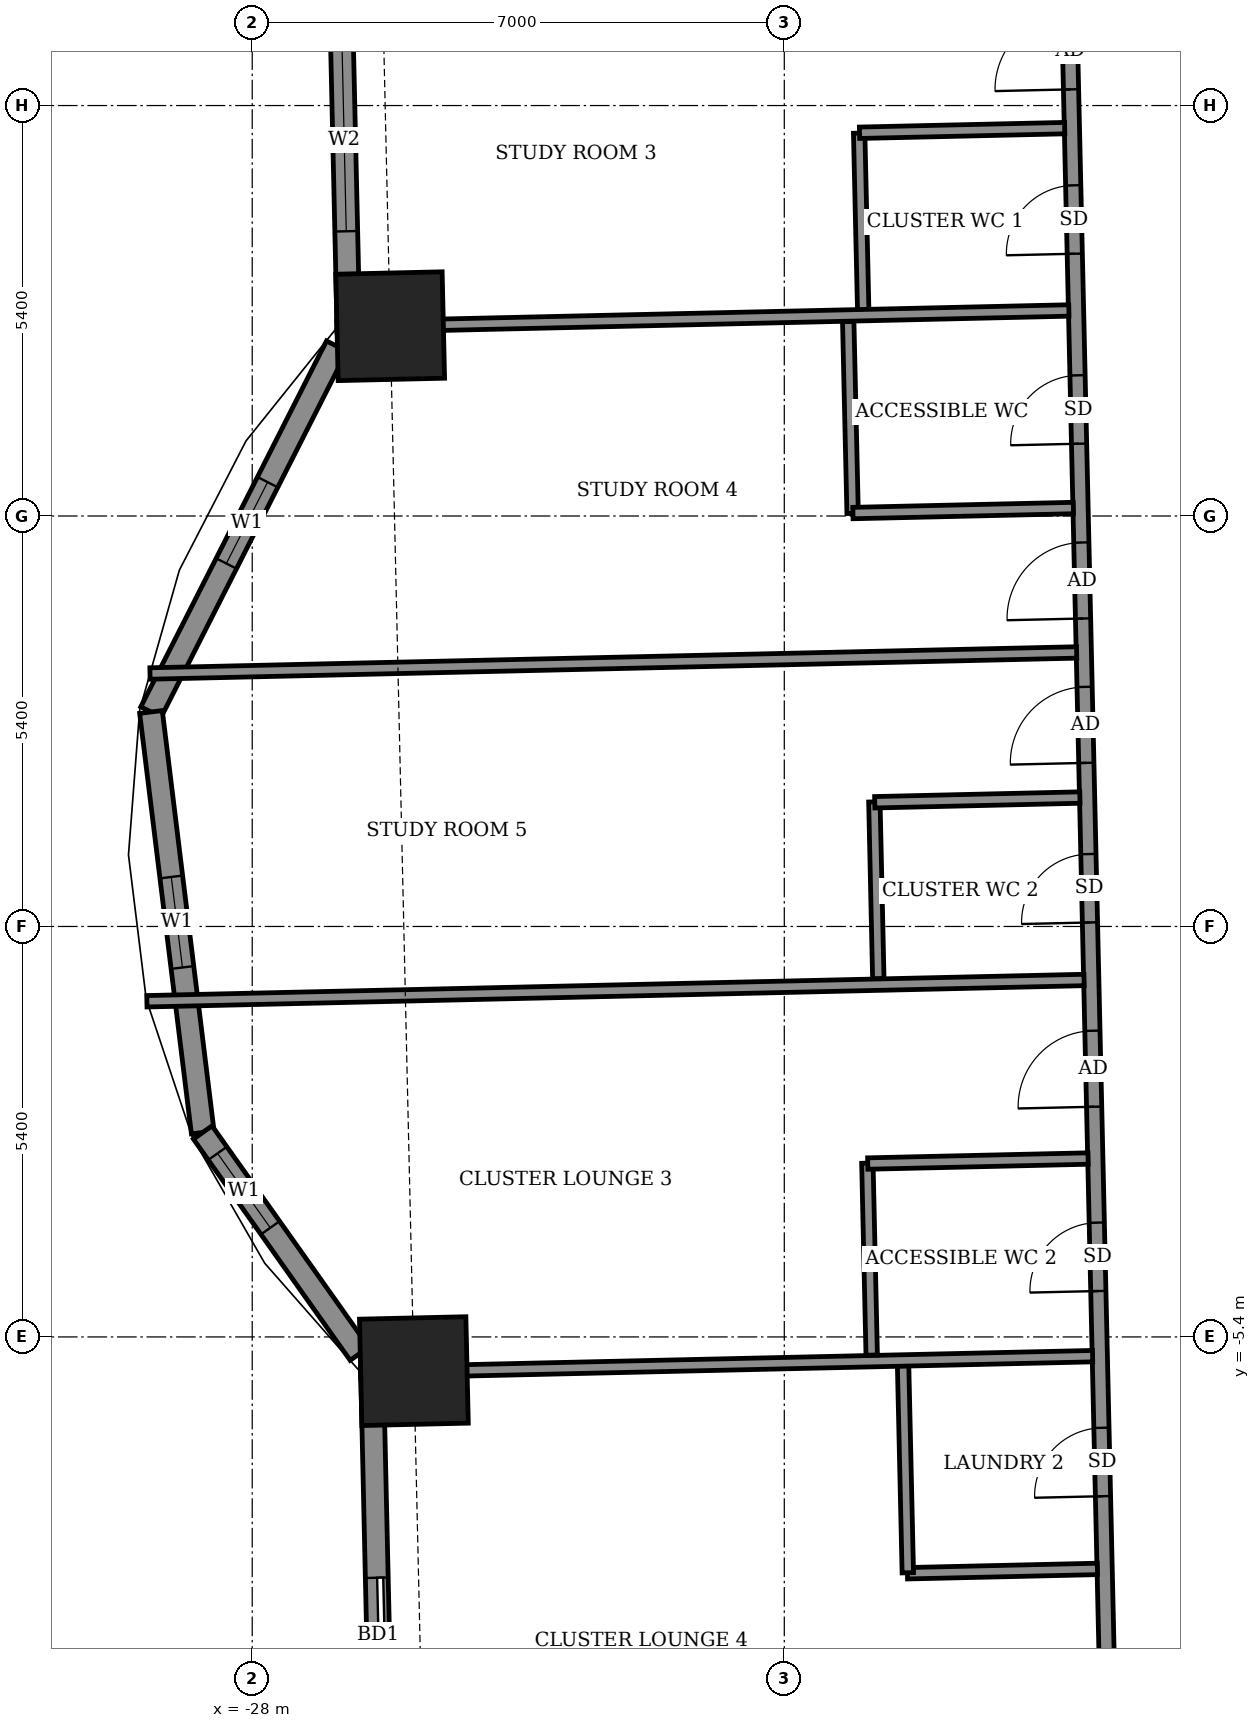
"""IFC4 building model, lengths in metres.
Left out: names, types, materials, properties, quantities, classifications, styles, units other than length and angle.
Written with IfcOpenShell. Run it as: python <this file> out.ifc"""

import sys

from ifc_helpers import new_model, si_unit, direction, frame, frame_2d, origin, origin_2d, place, context, subcontext, project, spatial, rectangle, extrude, element, fill, save


model = new_model("IFC4")
c1 = context("Model", 3, precision=1e-05, world=origin(), true_north=direction((0.0, 1.0)))
c2 = subcontext(c1, "Body", "Model", "MODEL_VIEW")
j1 = project(units=[si_unit("LENGTHUNIT", "METRE"), si_unit("PLANEANGLEUNIT", "RADIAN")], contexts=[c1])
p1 = place(None, origin())
s1 = spatial("IfcSite", under=j1, at=p1, CompositionType="ELEMENT")
p2 = place(p1, origin())
s2 = spatial("IfcBuilding", under=s1, at=p2, CompositionType="ELEMENT")
p3 = place(p2, frame((0.0, 0.0, 90.1)))
s3 = spatial("IfcBuildingStorey", under=s2, at=p3, CompositionType="ELEMENT", Elevation=90.1)
for number, where, z_axis, x_axis in (
    (1, (-25.873, -5.85, -0.55), (0.0, 0.0, 1.0), (0.023, -1.0, 0.0)),
    (2, (-26.185, 7.897, -0.55), (0.0, 0.0, 1.0), (0.023, -1.0, 0.0)),
):
    element("IfcColumn", number, at=place(p3, frame(where, z_axis=z_axis, x_axis=x_axis)), inside=s3, PredefinedType="COLUMN", context=c2, shape_type="SweptSolid", body=[
        extrude(rectangle(XDim=1.4, YDim=1.4, at=origin_2d()), origin(), (0.0, 0.0, 1.0), 3.6),
    ])
p4 = place(p3, frame((-27.036, 21.155, 0.0), z_axis=(0.0, 0.0, 1.0), x_axis=(0.022730142562, -0.999741636934, 0.0)))
e3 = element("IfcWall", 3, at=p4, inside=s3, PredefinedType="SOLIDWALL", context=c2, shape_type="SweptSolid", body=[
    extrude(rectangle(XDim=13.329, YDim=0.3, at=frame_2d((6.665, 0.0))), origin(), (0.0, 0.0, 1.0), 3.05),
])
p5 = place(p4, frame((2.805, 0.0, 0.0)))
e4 = element("IfcOpeningElement", 4, at=p5, cuts=e3, PredefinedType="OPENING", context=c2, shape_type="SweptSolid", body=[
    extrude(rectangle(XDim=1.5, YDim=2.4, at=frame_2d((0.75, 1.2))), frame((0.0, 0.16, 0.0), z_axis=(0.0, -1.0, 0.0), x_axis=(1.0, 0.0, 0.0)), (0.0, 0.0, 1.0), 0.32),
])
p6 = place(p4, frame((9.612, 0.0, 0.9)))
e5 = element("IfcOpeningElement", 5, at=p6, cuts=e3, PredefinedType="OPENING", context=c2, shape_type="SweptSolid", body=[
    extrude(rectangle(XDim=2.4, YDim=1.5, at=frame_2d((1.2, 0.75))), frame((0.0, 0.16, 0.0), z_axis=(0.0, -1.0, 0.0), x_axis=(1.0, 0.0, 0.0)), (0.0, 0.0, 1.0), 0.32),
])
p7 = place(p3, frame((-26.889, 7.635, 0.0), z_axis=(0.0, 0.0, 1.0), x_axis=(-0.452633159278, -0.891696822425, 0.0)))
e6 = element("IfcWall", 6, at=p7, inside=s3, PredefinedType="SOLIDWALL", context=c2, shape_type="SweptSolid", body=[
    extrude(rectangle(XDim=5.397, YDim=0.3, at=frame_2d((2.699, 0.0))), origin(), (0.0, 0.0, 1.0), 3.05),
])
p8 = place(p7, frame((2.007, 0.0, 0.9)))
e7 = element("IfcOpeningElement", 7, at=p8, cuts=e6, PredefinedType="OPENING", context=c2, shape_type="SweptSolid", body=[
    extrude(rectangle(XDim=1.2, YDim=1.5, at=frame_2d((0.6, 0.75))), frame((0.0, 0.16, 0.0), z_axis=(0.0, -1.0, 0.0), x_axis=(1.0, 0.0, 0.0)), (0.0, 0.0, 1.0), 0.32),
])
p9 = place(p3, frame((-29.332, 2.822, 0.0), z_axis=(0.0, 0.0, 1.0), x_axis=(0.122206978992, -0.992504636909, 0.0)))
e8 = element("IfcWall", 8, at=p9, inside=s3, PredefinedType="SOLIDWALL", context=c2, shape_type="SweptSolid", body=[
    extrude(rectangle(XDim=5.574, YDim=0.3, at=frame_2d((2.787, 0.0))), origin(), (0.0, 0.0, 1.0), 3.05),
])
p10 = place(p9, frame((2.187, 0.0, 0.9)))
e9 = element("IfcOpeningElement", 9, at=p10, cuts=e8, PredefinedType="OPENING", context=c2, shape_type="SweptSolid", body=[
    extrude(rectangle(XDim=1.2, YDim=1.5, at=frame_2d((0.6, 0.75))), frame((0.0, 0.16, 0.0), z_axis=(0.0, -1.0, 0.0), x_axis=(1.0, 0.0, 0.0)), (0.0, 0.0, 1.0), 0.32),
])
p11 = place(p3, frame((-28.651, -2.71, 0.0), z_axis=(0.0, 0.0, 1.0), x_axis=(0.577964171051, -0.816062140392, 0.0)))
e10 = element("IfcWall", 10, at=p11, inside=s3, PredefinedType="SOLIDWALL", context=c2, shape_type="SweptSolid", body=[
    extrude(rectangle(XDim=3.567, YDim=0.3, at=frame_2d((1.784, 0.0))), origin(), (0.0, 0.0, 1.0), 3.05),
])
p12 = place(p11, frame((0.337, 0.0, 0.9)))
e11 = element("IfcOpeningElement", 11, at=p12, cuts=e10, PredefinedType="OPENING", context=c2, shape_type="SweptSolid", body=[
    extrude(rectangle(XDim=1.2, YDim=1.5, at=frame_2d((0.6, 0.75))), frame((0.0, 0.16, 0.0), z_axis=(0.0, -1.0, 0.0), x_axis=(1.0, 0.0, 0.0)), (0.0, 0.0, 1.0), 0.32),
])
p13 = place(p3, frame((-26.424, -5.808, 0.0), z_axis=(0.0, 0.0, 1.0), x_axis=(0.022654755793, -0.999743348085, 0.0)))
e12 = element("IfcWall", 12, at=p13, inside=s3, PredefinedType="SOLIDWALL", context=c2, shape_type="SweptSolid", body=[
    extrude(rectangle(XDim=13.729, YDim=0.3, at=frame_2d((6.865, 0.0))), origin(), (0.0, 0.0, 1.0), 3.05),
])
p14 = place(p13, frame((2.761, 0.0, 0.0)))
e13 = element("IfcOpeningElement", 13, at=p14, cuts=e12, PredefinedType="OPENING", context=c2, shape_type="SweptSolid", body=[
    extrude(rectangle(XDim=1.5, YDim=2.4, at=frame_2d((0.75, 1.2))), frame((0.0, 0.16, 0.0), z_axis=(0.0, -1.0, 0.0), x_axis=(1.0, 0.0, 0.0)), (0.0, 0.0, 1.0), 0.32),
])
p15 = place(p13, frame((8.894, 0.0, 0.9)))
e14 = element("IfcOpeningElement", 14, at=p15, cuts=e12, PredefinedType="OPENING", context=c2, shape_type="SweptSolid", body=[
    extrude(rectangle(XDim=2.4, YDim=1.5, at=frame_2d((1.2, 0.75))), frame((0.0, 0.16, 0.0), z_axis=(0.0, -1.0, 0.0), x_axis=(1.0, 0.0, 0.0)), (0.0, 0.0, 1.0), 0.32),
])
p16 = place(p3, frame((-29.57, 10.945, 0.0), z_axis=(0.0, 0.0, 1.0), x_axis=(-0.022665943652, 0.999743094499, 0.0)))
e15 = element("IfcWall", 15, at=p16, inside=s3, PredefinedType="USERDEFINED", context=c2, shape_type="SweptSolid", body=[
    extrude(rectangle(XDim=6.0, YDim=0.55, at=frame_2d((3.0, 0.0))), origin(), (0.0, 0.0, 1.0), 0.8),
])
p17 = place(p3, frame((-29.116, -9.05, 0.0), z_axis=(0.0, 0.0, 1.0), x_axis=(-0.022590224177, 0.999744808324, 0.0)))
e16 = element("IfcWall", 16, at=p17, inside=s3, PredefinedType="USERDEFINED", context=c2, shape_type="SweptSolid", body=[
    extrude(rectangle(XDim=2.875, YDim=0.55, at=frame_2d((1.438, 0.0))), origin(), (0.0, 0.0, 1.0), 0.8),
])
p18 = place(p3, frame((-16.684, -12.919, 0.0), z_axis=(0.0, 0.0, 1.0), x_axis=(-0.022706151961, 0.999742182097, 0.0)))
e17 = element("IfcWall", 17, at=p18, inside=s3, PredefinedType="PARTITIONING", context=c2, shape_type="SweptSolid", body=[
    extrude(rectangle(XDim=25.45, YDim=0.2, at=frame_2d((12.725, 0.0))), origin(), (0.0, 0.0, 1.0), 3.05),
])
p19 = place(p18, frame((23.938, 0.0, 0.0)))
e18 = element("IfcOpeningElement", 18, at=p19, cuts=e17, PredefinedType="OPENING", context=c2, shape_type="SweptSolid", body=[
    extrude(rectangle(XDim=1.0, YDim=2.1, at=frame_2d((0.5, 1.05))), frame((0.0, 0.11, 0.0), z_axis=(0.0, -1.0, 0.0), x_axis=(1.0, 0.0, 0.0)), (0.0, 0.0, 1.0), 0.22),
])
p20 = place(p18, frame((21.775, 0.0, 0.0)))
e19 = element("IfcOpeningElement", 19, at=p20, cuts=e17, PredefinedType="OPENING", context=c2, shape_type="SweptSolid", body=[
    extrude(rectangle(XDim=0.9, YDim=2.1, at=frame_2d((0.45, 1.05))), frame((0.0, 0.11, 0.0), z_axis=(0.0, -1.0, 0.0), x_axis=(1.0, 0.0, 0.0)), (0.0, 0.0, 1.0), 0.22),
])
p21 = place(p18, frame((16.975, 0.0, 0.0)))
e20 = element("IfcOpeningElement", 20, at=p21, cuts=e17, PredefinedType="OPENING", context=c2, shape_type="SweptSolid", body=[
    extrude(rectangle(XDim=1.0, YDim=2.1, at=frame_2d((0.5, 1.05))), frame((0.0, 0.11, 0.0), z_axis=(0.0, -1.0, 0.0), x_axis=(1.0, 0.0, 0.0)), (0.0, 0.0, 1.0), 0.22),
])
p22 = place(p18, frame((19.275, 0.0, 0.0)))
e21 = element("IfcOpeningElement", 21, at=p22, cuts=e17, PredefinedType="OPENING", context=c2, shape_type="SweptSolid", body=[
    extrude(rectangle(XDim=0.9, YDim=2.1, at=frame_2d((0.45, 1.05))), frame((0.0, 0.11, 0.0), z_axis=(0.0, -1.0, 0.0), x_axis=(1.0, 0.0, 0.0)), (0.0, 0.0, 1.0), 0.22),
])
p23 = place(p18, frame((15.075, 0.0, 0.0)))
e22 = element("IfcOpeningElement", 22, at=p23, cuts=e17, PredefinedType="OPENING", context=c2, shape_type="SweptSolid", body=[
    extrude(rectangle(XDim=1.0, YDim=2.1, at=frame_2d((0.5, 1.05))), frame((0.0, 0.11, 0.0), z_axis=(0.0, -1.0, 0.0), x_axis=(1.0, 0.0, 0.0)), (0.0, 0.0, 1.0), 0.22),
])
p24 = place(p18, frame((12.975, 0.0, 0.0)))
e23 = element("IfcOpeningElement", 23, at=p24, cuts=e17, PredefinedType="OPENING", context=c2, shape_type="SweptSolid", body=[
    extrude(rectangle(XDim=0.9, YDim=2.1, at=frame_2d((0.45, 1.05))), frame((0.0, 0.11, 0.0), z_axis=(0.0, -1.0, 0.0), x_axis=(1.0, 0.0, 0.0)), (0.0, 0.0, 1.0), 0.22),
])
p25 = place(p18, frame((10.55, 0.0, 0.0)))
e24 = element("IfcOpeningElement", 24, at=p25, cuts=e17, PredefinedType="OPENING", context=c2, shape_type="SweptSolid", body=[
    extrude(rectangle(XDim=1.0, YDim=2.1, at=frame_2d((0.5, 1.05))), frame((0.0, 0.11, 0.0), z_axis=(0.0, -1.0, 0.0), x_axis=(1.0, 0.0, 0.0)), (0.0, 0.0, 1.0), 0.22),
])
p26 = place(p18, frame((8.125, 0.0, 0.0)))
e25 = element("IfcOpeningElement", 25, at=p26, cuts=e17, PredefinedType="OPENING", context=c2, shape_type="SweptSolid", body=[
    extrude(rectangle(XDim=0.9, YDim=2.1, at=frame_2d((0.45, 1.05))), frame((0.0, 0.11, 0.0), z_axis=(0.0, -1.0, 0.0), x_axis=(1.0, 0.0, 0.0)), (0.0, 0.0, 1.0), 0.22),
])
p27 = place(p18, frame((1.737, 0.0, 0.0)))
e26 = element("IfcOpeningElement", 26, at=p27, cuts=e17, PredefinedType="OPENING", context=c2, shape_type="SweptSolid", body=[
    extrude(rectangle(XDim=1.0, YDim=2.1, at=frame_2d((0.5, 1.05))), frame((0.0, 0.11, 0.0), z_axis=(0.0, -1.0, 0.0), x_axis=(1.0, 0.0, 0.0)), (0.0, 0.0, 1.0), 0.22),
])
p28 = place(p18, frame((5.425, 0.0, 0.0)))
e27 = element("IfcOpeningElement", 27, at=p28, cuts=e17, PredefinedType="OPENING", context=c2, shape_type="SweptSolid", body=[
    extrude(rectangle(XDim=0.9, YDim=2.1, at=frame_2d((0.45, 1.05))), frame((0.0, 0.11, 0.0), z_axis=(0.0, -1.0, 0.0), x_axis=(1.0, 0.0, 0.0)), (0.0, 0.0, 1.0), 0.22),
])
p29 = place(p3, frame((-19.38, -8.509, 0.0), z_axis=(0.0, 0.0, 1.0), x_axis=(0.999738750294, 0.02285675306, 0.0)))
e28 = element("IfcWall", 28, at=p29, inside=s3, PredefinedType="PARTITIONING", context=c2, shape_type="SweptSolid", body=[
    extrude(rectangle(XDim=2.5, YDim=0.15, at=frame_2d((1.25, 0.0))), origin(), (0.0, 0.0, 1.0), 3.05),
])
p30 = place(p3, frame((-19.375, -8.503, 0.0), z_axis=(0.0, 0.0, 1.0), x_axis=(-0.022760079124, 0.999740955847, 0.0)))
e29 = element("IfcWall", 29, at=p30, inside=s3, PredefinedType="PARTITIONING", context=c2, shape_type="SweptSolid", body=[
    extrude(rectangle(XDim=2.725, YDim=0.15, at=frame_2d((1.362, 0.0))), origin(), (0.0, 0.0, 1.0), 3.05),
])
p31 = place(p3, frame((-26.573, -5.871, 0.0), z_axis=(0.0, 0.0, 1.0), x_axis=(0.999743768709, 0.022636186244, 0.0)))
e30 = element("IfcWall", 30, at=p31, inside=s3, PredefinedType="PARTITIONING", context=c2, shape_type="SweptSolid", body=[
    extrude(rectangle(XDim=9.631, YDim=0.15, at=frame_2d((4.816, 0.0))), origin(), (0.0, 0.0, 1.0), 3.05),
])
p32 = place(p3, frame((-19.85, -5.639, 0.0), z_axis=(0.0, 0.0, 1.0), x_axis=(-0.022523775833, 0.999746307581, 0.0)))
e31 = element("IfcWall", 31, at=p32, inside=s3, PredefinedType="PARTITIONING", context=c2, shape_type="SweptSolid", body=[
    extrude(rectangle(XDim=2.526, YDim=0.15, at=frame_2d((1.263, 0.0))), origin(), (0.0, 0.0, 1.0), 3.05),
])
p33 = place(p3, frame((-19.902, -3.119, 0.0), z_axis=(0.0, 0.0, 1.0), x_axis=(0.999741618182, 0.022730967319, 0.0)))
e32 = element("IfcWall", 32, at=p33, inside=s3, PredefinedType="PARTITIONING", context=c2, shape_type="SweptSolid", body=[
    extrude(rectangle(XDim=2.9, YDim=0.15, at=frame_2d((1.45, 0.0))), origin(), (0.0, 0.0, 1.0), 3.05),
])
p34 = place(p3, frame((-29.386, -0.984, 0.0), z_axis=(0.0, 0.0, 1.0), x_axis=(0.999742652464, 0.022685432436, 0.0)))
e33 = element("IfcWall", 33, at=p34, inside=s3, PredefinedType="PARTITIONING", context=c2, shape_type="SweptSolid", body=[
    extrude(rectangle(XDim=12.333, YDim=0.15, at=frame_2d((6.167, 0.0))), origin(), (0.0, 0.0, 1.0), 2.05),
])
p35 = place(p3, frame((-19.763, -0.685, 0.0), z_axis=(0.0, 0.0, 1.0), x_axis=(-0.022370700241, 0.999749744571, 0.0)))
e34 = element("IfcWall", 34, at=p35, inside=s3, PredefinedType="PARTITIONING", context=c2, shape_type="SweptSolid", body=[
    extrude(rectangle(XDim=2.324, YDim=0.15, at=frame_2d((1.162, 0.0))), origin(), (0.0, 0.0, 1.0), 3.05),
])
p36 = place(p3, frame((-19.81, 1.634, 0.0), z_axis=(0.0, 0.0, 1.0), x_axis=(0.999736155505, 0.022969966847, 0.0)))
e35 = element("IfcWall", 35, at=p36, inside=s3, PredefinedType="PARTITIONING", context=c2, shape_type="SweptSolid", body=[
    extrude(rectangle(XDim=2.7, YDim=0.15, at=frame_2d((1.35, 0.0))), origin(), (0.0, 0.0, 1.0), 3.05),
])
p37 = place(p3, frame((-29.345, 3.328, 0.0), z_axis=(0.0, 0.0, 1.0), x_axis=(0.999741773524, 0.022724134116, 0.0)))
e36 = element("IfcWall", 36, at=p37, inside=s3, PredefinedType="PARTITIONING", context=c2, shape_type="SweptSolid", body=[
    extrude(rectangle(XDim=12.194, YDim=0.15, at=frame_2d((6.097, 0.0))), origin(), (0.0, 0.0, 1.0), 2.05),
])
p38 = place(p3, frame((-20.101, 5.434, 0.0), z_axis=(0.0, 0.0, 1.0), x_axis=(-0.022919108675, 0.999737322729, 0.0)))
e37 = element("IfcWall", 37, at=p38, inside=s3, PredefinedType="PARTITIONING", context=c2, shape_type="SweptSolid", body=[
    extrude(rectangle(XDim=2.525, YDim=0.15, at=frame_2d((1.262, 0.0))), origin(), (0.0, 0.0, 1.0), 3.05),
])
p39 = place(p3, frame((-20.097, 5.439, 0.0), z_axis=(0.0, 0.0, 1.0), x_axis=(0.999741748633, 0.022725229174, 0.0)))
e38 = element("IfcWall", 38, at=p39, inside=s3, PredefinedType="PARTITIONING", context=c2, shape_type="SweptSolid", body=[
    extrude(rectangle(XDim=2.901, YDim=0.15, at=frame_2d((1.45, 0.0))), origin(), (0.0, 0.0, 1.0), 3.05),
])
p40 = place(p3, frame((-19.962, 8.112, 0.0), z_axis=(0.0, 0.0, 1.0), x_axis=(-0.022781023197, 0.999740478815, 0.0)))
e39 = element("IfcWall", 39, at=p40, inside=s3, PredefinedType="PARTITIONING", context=c2, shape_type="SweptSolid", body=[
    extrude(rectangle(XDim=2.325, YDim=0.15, at=frame_2d((1.163, 0.0))), origin(), (0.0, 0.0, 1.0), 3.05),
])
p41 = place(p3, frame((-26.885, 7.885, 0.0), z_axis=(0.0, 0.0, 1.0), x_axis=(0.999741468995, 0.022737527832, 0.0)))
e40 = element("IfcWall", 40, at=p41, inside=s3, PredefinedType="PARTITIONING", context=c2, shape_type="SweptSolid", body=[
    extrude(rectangle(XDim=9.631, YDim=0.15, at=frame_2d((4.816, 0.0))), origin(), (0.0, 0.0, 1.0), 3.05),
])
p42 = place(p3, frame((-20.01, 10.442, 0.0), z_axis=(0.0, 0.0, 1.0), x_axis=(0.999744396973, 0.02260842146, 0.0)))
e41 = element("IfcWall", 41, at=p42, inside=s3, PredefinedType="PARTITIONING", context=c2, shape_type="SweptSolid", body=[
    extrude(rectangle(XDim=2.7, YDim=0.15, at=frame_2d((1.35, 0.0))), origin(), (0.0, 0.0, 1.0), 3.05),
])
p43 = place(p6, origin())
e42 = element("IfcWindow", 42, at=p43, inside=s3, PartitioningType="DOUBLE_PANEL_VERTICAL", PredefinedType="WINDOW", context=c2, shape_type="SweptSolid", body=[
    extrude(rectangle(XDim=2.4, YDim=1.5, at=frame_2d((1.2, 0.75))), frame((0.0, 0.03, 0.0), z_axis=(0.0, -1.0, 0.0), x_axis=(1.0, 0.0, 0.0)), (0.0, 0.0, 1.0), 0.06),
])
fill(e5, e42)
p44 = place(p8, origin())
e43 = element("IfcWindow", 43, at=p44, inside=s3, PartitioningType="SINGLE_PANEL", PredefinedType="WINDOW", context=c2, shape_type="SweptSolid", body=[
    extrude(rectangle(XDim=1.2, YDim=1.5, at=frame_2d((0.6, 0.75))), frame((0.0, 0.03, 0.0), z_axis=(0.0, -1.0, 0.0), x_axis=(1.0, 0.0, 0.0)), (0.0, 0.0, 1.0), 0.06),
])
fill(e7, e43)
p45 = place(p10, origin())
e44 = element("IfcWindow", 44, at=p45, inside=s3, PartitioningType="SINGLE_PANEL", PredefinedType="WINDOW", context=c2, shape_type="SweptSolid", body=[
    extrude(rectangle(XDim=1.2, YDim=1.5, at=frame_2d((0.6, 0.75))), frame((0.0, 0.03, 0.0), z_axis=(0.0, -1.0, 0.0), x_axis=(1.0, 0.0, 0.0)), (0.0, 0.0, 1.0), 0.06),
])
fill(e9, e44)
p46 = place(p12, origin())
e45 = element("IfcWindow", 45, at=p46, inside=s3, PartitioningType="SINGLE_PANEL", PredefinedType="WINDOW", context=c2, shape_type="SweptSolid", body=[
    extrude(rectangle(XDim=1.2, YDim=1.5, at=frame_2d((0.6, 0.75))), frame((0.0, 0.03, 0.0), z_axis=(0.0, -1.0, 0.0), x_axis=(1.0, 0.0, 0.0)), (0.0, 0.0, 1.0), 0.06),
])
fill(e11, e45)
p47 = place(p14, origin())
e46 = element("IfcDoor", 46, at=p47, inside=s3, OperationType="SLIDING_TO_LEFT", PredefinedType="DOOR", context=c2, shape_type="SweptSolid", body=[
    extrude(rectangle(XDim=1.5, YDim=2.4, at=frame_2d((0.75, 1.2))), frame((0.0, 0.025, 0.0), z_axis=(0.0, -1.0, 0.0), x_axis=(1.0, 0.0, 0.0)), (0.0, 0.0, 1.0), 0.05),
])
fill(e13, e46)
p48 = place(p19, origin())
e47 = element("IfcDoor", 47, at=p48, inside=s3, OperationType="SINGLE_SWING_LEFT", PredefinedType="DOOR", context=c2, shape_type="SweptSolid", body=[
    extrude(rectangle(XDim=1.0, YDim=2.1, at=frame_2d((0.5, 1.05))), frame((0.0, 0.025, 0.0), z_axis=(0.0, -1.0, 0.0), x_axis=(1.0, 0.0, 0.0)), (0.0, 0.0, 1.0), 0.05),
])
fill(e18, e47)
p49 = place(p20, origin())
e48 = element("IfcDoor", 48, at=p49, inside=s3, OperationType="SINGLE_SWING_LEFT", PredefinedType="DOOR", context=c2, shape_type="SweptSolid", body=[
    extrude(rectangle(XDim=0.9, YDim=2.1, at=frame_2d((0.45, 1.05))), frame((0.0, 0.025, 0.0), z_axis=(0.0, -1.0, 0.0), x_axis=(1.0, 0.0, 0.0)), (0.0, 0.0, 1.0), 0.05),
])
fill(e19, e48)
p50 = place(p21, origin())
e49 = element("IfcDoor", 49, at=p50, inside=s3, OperationType="SINGLE_SWING_RIGHT", PredefinedType="DOOR", context=c2, shape_type="SweptSolid", body=[
    extrude(rectangle(XDim=1.0, YDim=2.1, at=frame_2d((0.5, 1.05))), frame((0.0, 0.025, 0.0), z_axis=(0.0, -1.0, 0.0), x_axis=(1.0, 0.0, 0.0)), (0.0, 0.0, 1.0), 0.05),
])
fill(e20, e49)
p51 = place(p22, origin())
e50 = element("IfcDoor", 50, at=p51, inside=s3, OperationType="SINGLE_SWING_RIGHT", PredefinedType="DOOR", context=c2, shape_type="SweptSolid", body=[
    extrude(rectangle(XDim=0.9, YDim=2.1, at=frame_2d((0.45, 1.05))), frame((0.0, 0.025, 0.0), z_axis=(0.0, -1.0, 0.0), x_axis=(1.0, 0.0, 0.0)), (0.0, 0.0, 1.0), 0.05),
])
fill(e21, e50)
p52 = place(p23, origin())
e51 = element("IfcDoor", 51, at=p52, inside=s3, OperationType="SINGLE_SWING_LEFT", PredefinedType="DOOR", context=c2, shape_type="SweptSolid", body=[
    extrude(rectangle(XDim=1.0, YDim=2.1, at=frame_2d((0.5, 1.05))), frame((0.0, 0.025, 0.0), z_axis=(0.0, -1.0, 0.0), x_axis=(1.0, 0.0, 0.0)), (0.0, 0.0, 1.0), 0.05),
])
fill(e22, e51)
p53 = place(p24, origin())
e52 = element("IfcDoor", 52, at=p53, inside=s3, OperationType="SINGLE_SWING_LEFT", PredefinedType="DOOR", context=c2, shape_type="SweptSolid", body=[
    extrude(rectangle(XDim=0.9, YDim=2.1, at=frame_2d((0.45, 1.05))), frame((0.0, 0.025, 0.0), z_axis=(0.0, -1.0, 0.0), x_axis=(1.0, 0.0, 0.0)), (0.0, 0.0, 1.0), 0.05),
])
fill(e23, e52)
p54 = place(p25, origin())
e53 = element("IfcDoor", 53, at=p54, inside=s3, OperationType="SINGLE_SWING_RIGHT", PredefinedType="DOOR", context=c2, shape_type="SweptSolid", body=[
    extrude(rectangle(XDim=1.0, YDim=2.1, at=frame_2d((0.5, 1.05))), frame((0.0, 0.025, 0.0), z_axis=(0.0, -1.0, 0.0), x_axis=(1.0, 0.0, 0.0)), (0.0, 0.0, 1.0), 0.05),
])
fill(e24, e53)
p55 = place(p26, origin())
e54 = element("IfcDoor", 54, at=p55, inside=s3, OperationType="SINGLE_SWING_RIGHT", PredefinedType="DOOR", context=c2, shape_type="SweptSolid", body=[
    extrude(rectangle(XDim=0.9, YDim=2.1, at=frame_2d((0.45, 1.05))), frame((0.0, 0.025, 0.0), z_axis=(0.0, -1.0, 0.0), x_axis=(1.0, 0.0, 0.0)), (0.0, 0.0, 1.0), 0.05),
])
fill(e25, e54)
p56 = place(p28, origin())
e55 = element("IfcDoor", 55, at=p56, inside=s3, OperationType="SINGLE_SWING_LEFT", PredefinedType="DOOR", context=c2, shape_type="SweptSolid", body=[
    extrude(rectangle(XDim=0.9, YDim=2.1, at=frame_2d((0.45, 1.05))), frame((0.0, 0.025, 0.0), z_axis=(0.0, -1.0, 0.0), x_axis=(1.0, 0.0, 0.0)), (0.0, 0.0, 1.0), 0.05),
])
fill(e27, e55)
save(model, sys.argv[1])
